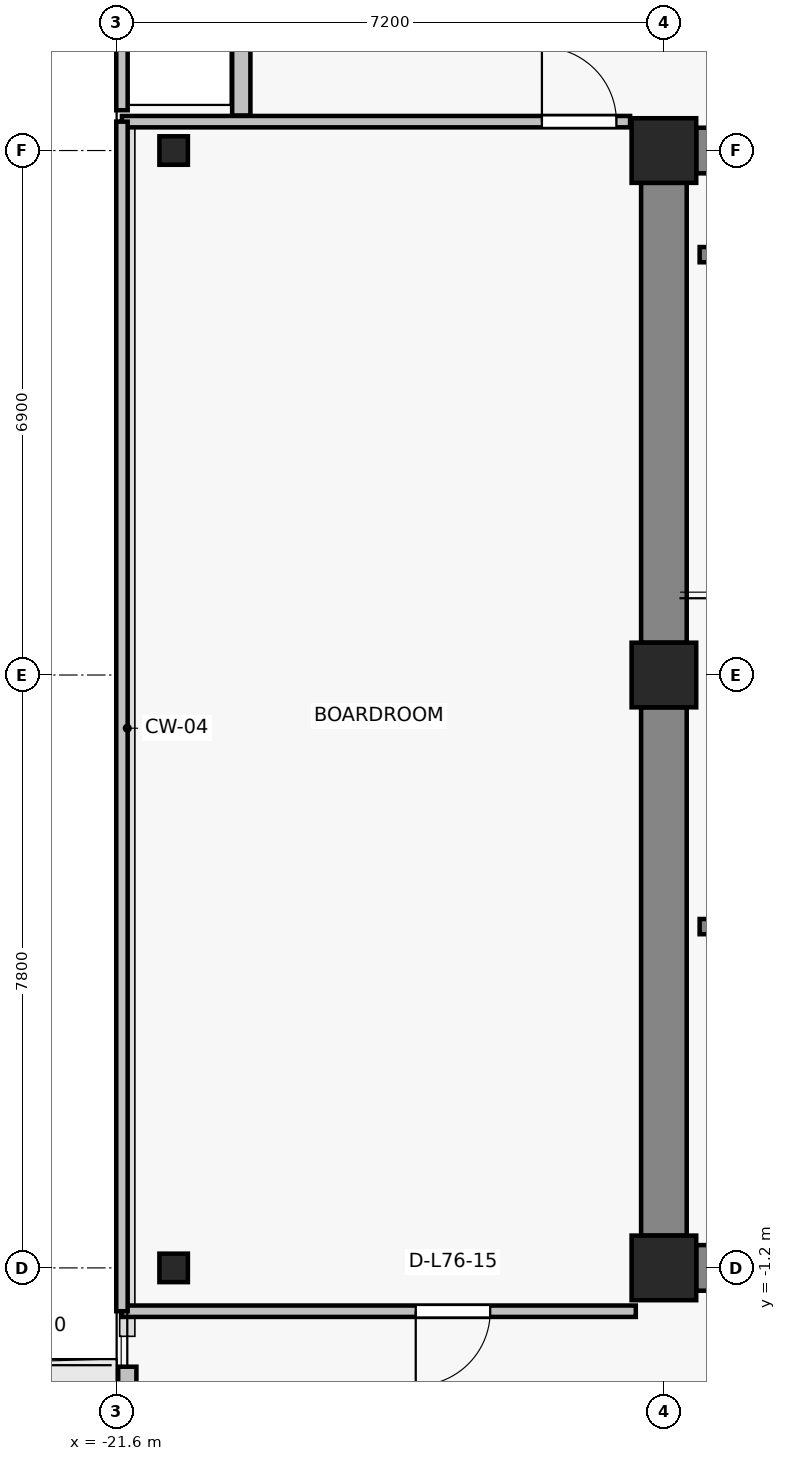
"""IFC4 building model, lengths in metres.
Left out: names, types, materials, properties, quantities, classifications, styles, units other than length and angle.
Written with IfcOpenShell. Run it as: python <this file> out.ifc"""

import sys

from ifc_helpers import new_model, si_unit, direction, frame, frame_2d, origin, origin_2d, place, context, subcontext, project, spatial, rectangle, i_section, extrude, source, transform, mapped, element, fill, save


model = new_model("IFC4")
c1 = context("Model", 3, precision=1e-05, world=origin(), true_north=direction((0.0, 1.0)))
c2 = subcontext(c1, "Body", "Model", "MODEL_VIEW")
j1 = project(units=[si_unit("LENGTHUNIT", "METRE"), si_unit("PLANEANGLEUNIT", "RADIAN")], contexts=[c1])
p1 = place(None, origin())
s1 = spatial("IfcSite", under=j1, at=p1, CompositionType="ELEMENT")
p2 = place(p1, origin())
s2 = spatial("IfcBuilding", under=s1, at=p2, CompositionType="ELEMENT")
p3 = place(p2, frame((0.0, 0.0, 268.3)))
s3 = spatial("IfcBuildingStorey", under=s2, at=p3, CompositionType="ELEMENT", Elevation=268.3)
for number, where, z_axis, x_axis in (
    (1, (-14.4, -1.2, 0.0), (0.0, 0.0, 1.0), (1.0, 0.0, 0.0)),
    (2, (-14.4, 6.6, 0.0), (0.0, 0.0, 1.0), (1.0, 0.0, 0.0)),
    (3, (-14.4, 13.5, 0.0), (0.0, 0.0, 1.0), (1.0, 0.0, 0.0)),
):
    element("IfcColumn", number, at=place(p3, frame(where, z_axis=z_axis, x_axis=x_axis)), inside=s3, PredefinedType="COLUMN", context=c2, shape_type="SweptSolid", body=[
        extrude(rectangle(XDim=0.85, YDim=0.85, at=origin_2d()), origin(), (0.0, 0.0, 1.0), 3.3),
    ])
for number, where, z_axis, x_axis in (
    (4, (-20.85, -1.2, 0.0), (0.0, 0.0, 1.0), (1.0, 0.0, 0.0)),
    (5, (-20.85, 13.5, 0.0), (0.0, 0.0, 1.0), (1.0, 0.0, 0.0)),
):
    element("IfcColumn", number, at=place(p3, frame(where, z_axis=z_axis, x_axis=x_axis)), inside=s3, PredefinedType="COLUMN", context=c2, shape_type="SweptSolid", body=[
        extrude(i_section(OverallWidth=0.375, OverallDepth=0.375, WebThickness=0.017, FlangeThickness=0.027, FilletRadius=0.015, at=origin_2d()), origin(), (0.0, 0.0, 1.0), 3.3),
    ])
p4 = place(p3, frame((-13.975, 13.5, 0.0), z_axis=(0.0, 0.0, 1.0), x_axis=(1.0, 0.0, 0.0)))
e6 = element("IfcWall", 6, at=p4, inside=s3, PredefinedType="SHEAR", context=c2, shape_type="SweptSolid", body=[
    extrude(rectangle(XDim=6.35, YDim=0.6, at=frame_2d((3.175, 0.0))), origin(), (0.0, 0.0, 1.0), 3.08),
])
p5 = place(p3, frame((-14.4, -0.775, 0.0), z_axis=(0.0, 0.0, 1.0), x_axis=(0.0, 1.0, 0.0)))
e7 = element("IfcWall", 7, at=p5, inside=s3, PredefinedType="SHEAR", context=c2, shape_type="SweptSolid", body=[
    extrude(rectangle(XDim=6.95, YDim=0.6, at=frame_2d((3.475, 0.0))), origin(), (0.0, 0.0, 1.0), 3.08),
])
p6 = place(p3, frame((-14.4, 7.025, 0.0), z_axis=(0.0, 0.0, 1.0), x_axis=(0.0, 1.0, 0.0)))
e8 = element("IfcWall", 8, at=p6, inside=s3, PredefinedType="SHEAR", context=c2, shape_type="SweptSolid", body=[
    extrude(rectangle(XDim=6.05, YDim=0.6, at=frame_2d((3.025, 0.0))), origin(), (0.0, 0.0, 1.0), 3.08),
])
p7 = place(p3, frame((-7.625, -1.2, 0.0), z_axis=(0.0, 0.0, 1.0), x_axis=(-1.0, 0.0, 0.0)))
e9 = element("IfcWall", 9, at=p7, inside=s3, PredefinedType="SHEAR", context=c2, shape_type="SweptSolid", body=[
    extrude(rectangle(XDim=6.35, YDim=0.6, at=frame_2d((3.175, 0.0))), origin(), (0.0, 0.0, 1.0), 3.08),
])
p8 = place(p7, frame((2.7, 0.0, 0.0)))
e10 = element("IfcOpeningElement", 10, at=p8, cuts=e9, PredefinedType="OPENING", context=c2, shape_type="SweptSolid", body=[
    extrude(rectangle(XDim=1.15, YDim=2.15, at=frame_2d((0.575, 1.075))), frame((0.0, 0.31, 0.0), z_axis=(0.0, -1.0, 0.0), x_axis=(1.0, 0.0, 0.0)), (0.0, 0.0, 1.0), 0.62),
])
p9 = place(p3, frame((-21.46, -8.3, 0.0), z_axis=(0.0, 0.0, 1.0), x_axis=(0.0, 1.0, 0.0)))
e11 = element("IfcWall", 11, at=p9, inside=s3, PredefinedType="SOLIDWALL", context=c2, shape_type="SweptSolid", body=[
    extrude(rectangle(XDim=5.8, YDim=0.24, at=frame_2d((2.9, 0.0))), origin(), (0.0, 0.0, 1.0), 3.08),
])
p10 = place(p9, frame((0.696, 0.0, 0.0)))
e12 = element("IfcOpeningElement", 12, at=p10, cuts=e11, PredefinedType="OPENING", context=c2, shape_type="SweptSolid", body=[
    extrude(rectangle(XDim=1.0, YDim=2.2, at=frame_2d((0.5, 1.1))), frame((0.0, 0.13, 0.0), z_axis=(0.0, -1.0, 0.0), x_axis=(1.0, 0.0, 0.0)), (0.0, 0.0, 1.0), 0.26),
])
p11 = place(p9, frame((2.046, 0.0, 0.85)))
e13 = element("IfcOpeningElement", 13, at=p11, cuts=e11, PredefinedType="OPENING", context=c2, shape_type="SweptSolid", body=[
    extrude(rectangle(XDim=0.9, YDim=1.35, at=frame_2d((0.45, 0.675))), frame((0.0, 0.13, 0.0), z_axis=(0.0, -1.0, 0.0), x_axis=(1.0, 0.0, 0.0)), (0.0, 0.0, 1.0), 0.26),
])
p12 = place(p3, frame((-19.96, 15.46, 0.0), z_axis=(0.0, 0.0, 1.0), x_axis=(0.0, -1.0, 0.0)))
e14 = element("IfcWall", 14, at=p12, inside=s3, PredefinedType="SOLIDWALL", context=c2, shape_type="SweptSolid", body=[
    extrude(rectangle(XDim=1.5, YDim=0.24, at=frame_2d((0.75, 0.0))), origin(), (0.0, 0.0, 1.0), 3.08),
])
p13 = place(p3, frame((-10.41, 3.29, 0.0), z_axis=(0.0, 0.0, 1.0), x_axis=(-1.0, 0.0, 0.0)))
e15 = element("IfcWall", 15, at=p13, inside=s3, PredefinedType="SOLIDWALL", context=c2, shape_type="SweptSolid", body=[
    extrude(rectangle(XDim=3.52, YDim=0.2, at=frame_2d((1.76, 0.0))), origin(), (0.0, 0.0, 1.0), 3.08),
])
p14 = place(p13, frame((1.165, 0.0, 0.0)))
e16 = element("IfcOpeningElement", 16, at=p14, cuts=e15, PredefinedType="OPENING", context=c2, shape_type="SweptSolid", body=[
    extrude(rectangle(XDim=1.15, YDim=2.15, at=frame_2d((0.575, 1.075))), frame((0.0, 0.11, 0.0), z_axis=(0.0, -1.0, 0.0), x_axis=(1.0, 0.0, 0.0)), (0.0, 0.0, 1.0), 0.22),
])
p15 = place(p3, frame((-13.93, 12.13, 0.0), z_axis=(0.0, 0.0, 1.0), x_axis=(1.0, 0.0, 0.0)))
e17 = element("IfcWall", 17, at=p15, inside=s3, PredefinedType="SOLIDWALL", context=c2, shape_type="SweptSolid", body=[
    extrude(rectangle(XDim=3.52, YDim=0.2, at=frame_2d((1.76, 0.0))), origin(), (0.0, 0.0, 1.0), 3.08),
])
p16 = place(p3, frame((-14.77, -1.77, 0.0), z_axis=(0.0, 0.0, 1.0), x_axis=(-1.0, 0.0, 0.0)))
e18 = element("IfcWall", 18, at=p16, inside=s3, PredefinedType="PARTITIONING", context=c2, shape_type="SweptSolid", body=[
    extrude(rectangle(XDim=6.76, YDim=0.15, at=frame_2d((3.38, 0.0))), origin(), (0.0, 0.0, 1.0), 2.79),
])
p17 = place(p16, frame((1.915, 0.0, 0.0)))
e19 = element("IfcOpeningElement", 19, at=p17, cuts=e18, PredefinedType="OPENING", context=c2, shape_type="SweptSolid", body=[
    extrude(rectangle(XDim=0.98, YDim=2.15, at=frame_2d((0.49, 1.075))), frame((0.0, 0.085, 0.0), z_axis=(0.0, -1.0, 0.0), x_axis=(1.0, 0.0, 0.0)), (0.0, 0.0, 1.0), 0.17),
])
p18 = place(p3, frame((-21.53, 13.88, 0.0), z_axis=(0.0, 0.0, 1.0), x_axis=(1.0, 0.0, 0.0)))
e20 = element("IfcWall", 20, at=p18, inside=s3, PredefinedType="PARTITIONING", context=c2, shape_type="SweptSolid", body=[
    extrude(rectangle(XDim=6.685, YDim=0.15, at=frame_2d((3.343, 0.0))), origin(), (0.0, 0.0, 1.0), 3.08),
])
p19 = place(p18, frame((5.525, 0.0, 0.0)))
e21 = element("IfcOpeningElement", 21, at=p19, cuts=e20, PredefinedType="OPENING", context=c2, shape_type="SweptSolid", body=[
    extrude(rectangle(XDim=0.98, YDim=2.15, at=frame_2d((0.49, 1.075))), frame((0.0, 0.085, 0.0), z_axis=(0.0, -1.0, 0.0), x_axis=(1.0, 0.0, 0.0)), (0.0, 0.0, 1.0), 0.17),
])
p20 = place(p3, frame((-21.53, -1.77, 0.0), z_axis=(0.0, 0.0, 1.0), x_axis=(0.0, 1.0, 0.0)))
e22 = element("IfcWall", 22, at=p20, inside=s3, PredefinedType="PARTITIONING", context=c2, shape_type="SweptSolid", body=[
    extrude(rectangle(XDim=15.65, YDim=0.15, at=frame_2d((7.825, 0.0))), origin(), (0.0, 0.0, 1.0), 3.08),
])
p21 = place(p3, frame((-21.53, 14.03, 0.0), z_axis=(0.0, 0.0, 1.0), x_axis=(0.0, 1.0, 0.0)))
e23 = element("IfcWall", 23, at=p21, inside=s3, PredefinedType="PARTITIONING", context=c2, shape_type="SweptSolid", body=[
    extrude(rectangle(XDim=3.0, YDim=0.15, at=frame_2d((1.5, 0.0))), origin(), (0.0, 0.0, 1.0), 3.08),
])
m1 = source(origin(), c2, "Body", "SweptSolid", [
    extrude(rectangle(XDim=0.98, YDim=2.15, at=frame_2d((0.49, 1.075))), frame((0.0, 0.025, 0.0), z_axis=(0.0, -1.0, 0.0), x_axis=(1.0, 0.0, 0.0)), (0.0, 0.0, 1.0), 0.05),
])
p22 = place(p17, origin())
e24 = element("IfcDoor", 24, at=p22, inside=s3, OperationType="SINGLE_SWING_RIGHT", PredefinedType="DOOR", context=c2, shape_type="MappedRepresentation", body=[
    mapped(m1, transform((0.0, 0.0, 0.0), x_axis=(1.0, 0.0, 0.0), y_axis=(0.0, 1.0, 0.0), z_axis=(0.0, 0.0, 1.0), scale=1.0)),
])
fill(e19, e24)
p23 = place(p19, origin())
e25 = element("IfcDoor", 25, at=p23, inside=s3, OperationType="SINGLE_SWING_LEFT", PredefinedType="DOOR", context=c2, shape_type="MappedRepresentation", body=[
    mapped(m1, transform((0.0, 0.0, 0.0), x_axis=(1.0, 0.0, 0.0), y_axis=(0.0, 1.0, 0.0), z_axis=(0.0, 0.0, 1.0), scale=1.0)),
])
fill(e21, e25)
save(model, sys.argv[1])
